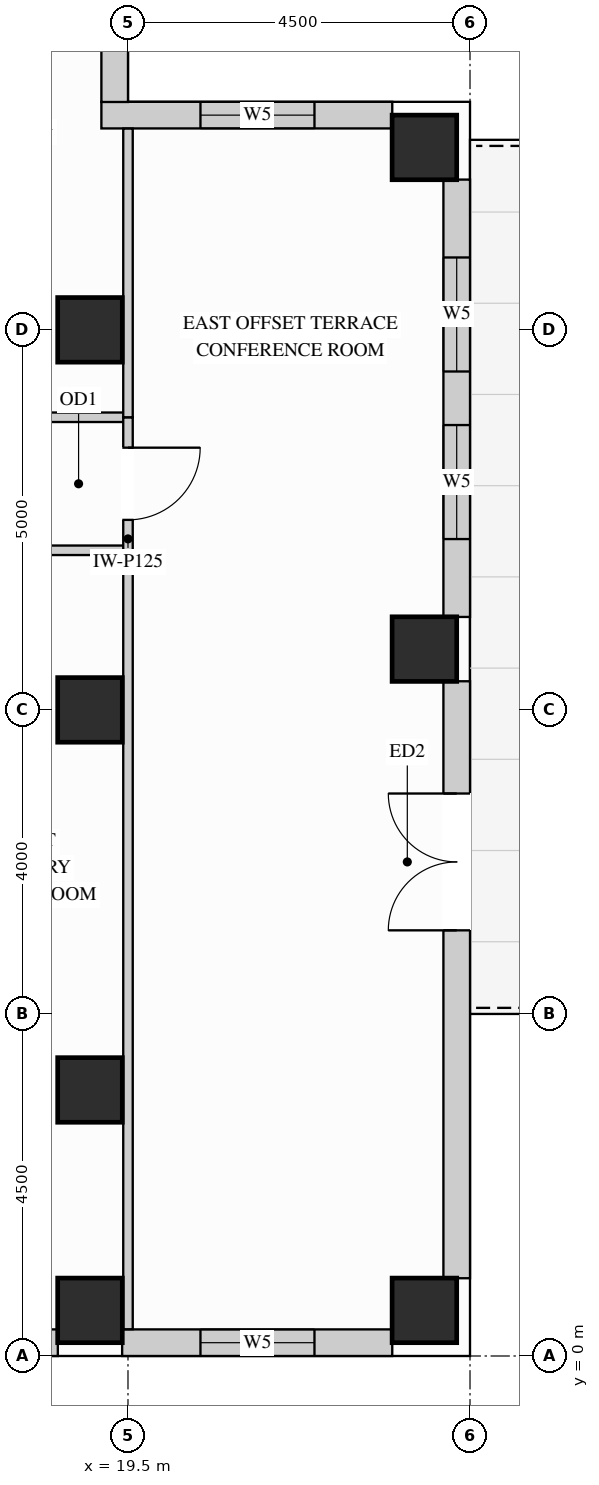
"""IFC4 building model, lengths in metres.
Left out: names, types, materials, properties, quantities, classifications, styles, units other than length and angle.
Written with IfcOpenShell. Run it as: python <this file> out.ifc"""

import sys

from ifc_helpers import new_model, si_unit, direction, frame, frame_2d, origin, origin_2d, place, context, subcontext, project, spatial, rectangle, extrude, source, transform, mapped, element, fill, save


model = new_model("IFC4")
c1 = context("Model", 3, precision=1e-05, world=origin(), true_north=direction((0.0, 1.0)))
c2 = subcontext(c1, "Body", "Model", "MODEL_VIEW")
j1 = project(units=[si_unit("LENGTHUNIT", "METRE"), si_unit("PLANEANGLEUNIT", "RADIAN")], contexts=[c1])
p1 = place(None, origin())
s1 = spatial("IfcSite", under=j1, at=p1, CompositionType="ELEMENT")
p2 = place(p1, origin())
s2 = spatial("IfcBuilding", under=s1, at=p2, CompositionType="ELEMENT")
p3 = place(p2, frame((0.0, 0.0, 262.8)))
s3 = spatial("IfcBuildingStorey", under=s2, at=p3, CompositionType="ELEMENT", Elevation=262.8)
m1 = source(origin(), c2, "Body", "SweptSolid", [
    extrude(rectangle(XDim=0.85, YDim=0.85, at=origin_2d()), origin(), (0.0, 0.0, 1.0), 3.4),
])
for number, where, z_axis, x_axis in (
    (1, (19.0, 13.5, 0.0), (0.0, 0.0, 1.0), (1.0, 0.0, 0.0)),
    (2, (19.0, 3.5, 0.0), (0.0, 0.0, 1.0), (1.0, 0.0, 0.0)),
    (3, (19.0, 8.5, 0.0), (0.0, 0.0, 1.0), (1.0, 0.0, 0.0)),
    (4, (19.0, 0.6, 0.0), (0.0, 0.0, 1.0), (1.0, 0.0, 0.0)),
    (5, (23.4, 0.6, 0.0), (0.0, 0.0, 1.0), (1.0, 0.0, 0.0)),
    (6, (23.4, 15.9, 0.0), (0.0, 0.0, 1.0), (1.0, 0.0, 0.0)),
    (7, (23.4, 9.3, 0.0), (0.0, 0.0, 1.0), (1.0, 0.0, 0.0)),
):
    element("IfcColumn", number, at=place(p3, frame(where, z_axis=z_axis, x_axis=x_axis)), inside=s3, PredefinedType="COLUMN", context=c2, shape_type="MappedRepresentation", body=[
        mapped(m1, transform((0.0, 0.0, 0.0), x_axis=(1.0, 0.0, 0.0), y_axis=(0.0, 1.0, 0.0), z_axis=(0.0, 0.0, 1.0))),
    ])
p4 = place(p3, frame((14.923, 0.175, 0.0), z_axis=(0.0, 0.0, 1.0), x_axis=(1.0, 0.0, 0.0)))
e8 = element("IfcWall", 8, at=p4, inside=s3, PredefinedType="SOLIDWALL", context=c2, shape_type="SweptSolid", body=[
    extrude(rectangle(XDim=3.654, YDim=0.35, at=frame_2d((1.827, 0.0))), origin(), (0.0, 0.0, 1.0), 3.385),
])
p5 = place(p4, frame((0.777, 0.0, 0.78)))
e9 = element("IfcOpeningElement", 9, at=p5, cuts=e8, PredefinedType="OPENING", context=c2, shape_type="SweptSolid", body=[
    extrude(rectangle(XDim=2.1, YDim=2.25, at=frame_2d((1.05, 1.125))), frame((0.0, 0.185, 0.0), z_axis=(0.0, -1.0, 0.0), x_axis=(1.0, 0.0, 0.0)), (0.0, 0.0, 1.0), 0.37),
])
p6 = place(p3, frame((19.423, 0.175, 0.0), z_axis=(0.0, 0.0, 1.0), x_axis=(1.0, 0.0, 0.0)))
e10 = element("IfcWall", 10, at=p6, inside=s3, PredefinedType="SOLIDWALL", context=c2, shape_type="SweptSolid", body=[
    extrude(rectangle(XDim=3.554, YDim=0.35, at=frame_2d((1.777, 0.0))), origin(), (0.0, 0.0, 1.0), 3.385),
])
p7 = place(p6, frame((1.031, 0.0, 0.78)))
e11 = element("IfcOpeningElement", 11, at=p7, cuts=e10, PredefinedType="OPENING", context=c2, shape_type="SweptSolid", body=[
    extrude(rectangle(XDim=1.5, YDim=2.0, at=frame_2d((0.75, 1.0))), frame((0.0, 0.185, 0.0), z_axis=(0.0, -1.0, 0.0), x_axis=(1.0, 0.0, 0.0)), (0.0, 0.0, 1.0), 0.37),
])
p8 = place(p3, frame((23.825, 1.023, 0.0), z_axis=(0.0, 0.0, 1.0), x_axis=(0.0, 1.0, 0.0)))
e12 = element("IfcWall", 12, at=p8, inside=s3, PredefinedType="SOLIDWALL", context=c2, shape_type="SweptSolid", body=[
    extrude(rectangle(XDim=7.854, YDim=0.35, at=frame_2d((3.927, 0.0))), origin(), (0.0, 0.0, 1.0), 3.385),
])
p9 = place(p8, frame((4.577, 0.0, 0.0)))
e13 = element("IfcOpeningElement", 13, at=p9, cuts=e12, PredefinedType="OPENING", context=c2, shape_type="SweptSolid", body=[
    extrude(rectangle(XDim=1.8, YDim=2.2, at=frame_2d((0.9, 1.1))), frame((0.0, 0.185, 0.0), z_axis=(0.0, -1.0, 0.0), x_axis=(1.0, 0.0, 0.0)), (0.0, 0.0, 1.0), 0.37),
])
p10 = place(p3, frame((23.825, 9.723, 0.0), z_axis=(0.0, 0.0, 1.0), x_axis=(0.0, 1.0, 0.0)))
e14 = element("IfcWall", 14, at=p10, inside=s3, PredefinedType="SOLIDWALL", context=c2, shape_type="SweptSolid", body=[
    extrude(rectangle(XDim=5.754, YDim=0.35, at=frame_2d((2.877, 0.0))), origin(), (0.0, 0.0, 1.0), 3.385),
])
p11 = place(p10, frame((1.025, 0.0, 0.78)))
e15 = element("IfcOpeningElement", 15, at=p11, cuts=e14, PredefinedType="OPENING", context=c2, shape_type="SweptSolid", body=[
    extrude(rectangle(XDim=1.5, YDim=2.0, at=frame_2d((0.75, 1.0))), frame((0.0, 0.185, 0.0), z_axis=(0.0, -1.0, 0.0), x_axis=(1.0, 0.0, 0.0)), (0.0, 0.0, 1.0), 0.37),
])
p12 = place(p10, frame((3.229, 0.0, 0.78)))
e16 = element("IfcOpeningElement", 16, at=p12, cuts=e14, PredefinedType="OPENING", context=c2, shape_type="SweptSolid", body=[
    extrude(rectangle(XDim=1.5, YDim=2.0, at=frame_2d((0.75, 1.0))), frame((0.0, 0.185, 0.0), z_axis=(0.0, -1.0, 0.0), x_axis=(1.0, 0.0, 0.0)), (0.0, 0.0, 1.0), 0.37),
])
p13 = place(p3, frame((22.977, 16.325, 0.0), z_axis=(0.0, 0.0, 1.0), x_axis=(-1.0, 0.0, 0.0)))
e17 = element("IfcWall", 17, at=p13, inside=s3, PredefinedType="SOLIDWALL", context=c2, shape_type="SweptSolid", body=[
    extrude(rectangle(XDim=3.827, YDim=0.35, at=frame_2d((1.914, 0.0))), origin(), (0.0, 0.0, 1.0), 3.385),
])
p14 = place(p13, frame((1.023, 0.0, 0.78)))
e18 = element("IfcOpeningElement", 18, at=p14, cuts=e17, PredefinedType="OPENING", context=c2, shape_type="SweptSolid", body=[
    extrude(rectangle(XDim=1.5, YDim=2.0, at=frame_2d((0.75, 1.0))), frame((0.0, 0.185, 0.0), z_axis=(0.0, -1.0, 0.0), x_axis=(1.0, 0.0, 0.0)), (0.0, 0.0, 1.0), 0.37),
])
m2 = source(origin(), c2, "Body", "SweptSolid", [
    extrude(rectangle(XDim=1.079, YDim=0.35, at=frame_2d((0.54, 0.0))), origin(), (0.0, 0.0, 1.0), 2.619),
])
p15 = place(p3, frame((19.325, 16.498, 0.0), z_axis=(0.0, 0.0, 1.0), x_axis=(0.0, 1.0, 0.0)))
e19 = element("IfcWall", 19, at=p15, inside=s3, PredefinedType="SOLIDWALL", context=c2, shape_type="MappedRepresentation", body=[
    mapped(m2, transform((0.0, 0.0, 0.0), x_axis=(1.0, 0.0, 0.0), y_axis=(0.0, 1.0, 0.0), z_axis=(0.0, 0.0, 1.0))),
])
m3 = source(origin(), c2, "Body", "SweptSolid", [
    extrude(rectangle(XDim=3.15, YDim=0.125, at=frame_2d((1.575, 0.0))), origin(), (0.0, 0.0, 1.0), 3.385),
])
for number, where, z_axis, x_axis in (
    (20, (16.35, 12.35, 0.0), (0.0, 0.0, 1.0), (1.0, 0.0, 0.0)),
    (21, (16.35, 10.6, 0.0), (0.0, 0.0, 1.0), (1.0, 0.0, 0.0)),
):
    element("IfcWall", number, at=place(p3, frame(where, z_axis=z_axis, x_axis=x_axis)), inside=s3, PredefinedType="PARTITIONING", context=c2, shape_type="MappedRepresentation", body=[
        mapped(m3, transform((0.0, 0.0, 0.0), x_axis=(1.0, 0.0, 0.0), y_axis=(0.0, 1.0, 0.0), z_axis=(0.0, 0.0, 1.0))),
    ])
p16 = place(p3, frame((19.5, 10.6, 0.0), z_axis=(0.0, 0.0, 1.0), x_axis=(0.0, 1.0, 0.0)))
e22 = element("IfcWall", 22, at=p16, inside=s3, PredefinedType="PARTITIONING", context=c2, shape_type="SweptSolid", body=[
    extrude(rectangle(XDim=1.75, YDim=0.125, at=frame_2d((0.875, 0.0))), origin(), (0.0, 0.0, 1.0), 3.385),
])
p17 = place(p16, frame((0.4, 0.0, 0.0)))
e23 = element("IfcOpeningElement", 23, at=p17, cuts=e22, PredefinedType="OPENING", context=c2, shape_type="SweptSolid", body=[
    extrude(rectangle(XDim=0.95, YDim=2.15, at=frame_2d((0.475, 1.075))), frame((0.0, 0.073, 0.0), z_axis=(0.0, -1.0, 0.0), x_axis=(1.0, 0.0, 0.0)), (0.0, 0.0, 1.0), 0.145),
])
m4 = source(origin(), c2, "Body", "SweptSolid", [
    extrude(rectangle(XDim=10.248, YDim=0.125, at=frame_2d((5.124, 0.0))), origin(), (0.0, 0.0, 1.0), 3.385),
])
p18 = place(p3, frame((19.5, 0.352, 0.0), z_axis=(0.0, 0.0, 1.0), x_axis=(0.0, 1.0, 0.0)))
e24 = element("IfcWall", 24, at=p18, inside=s3, PredefinedType="PARTITIONING", context=c2, shape_type="MappedRepresentation", body=[
    mapped(m4, transform((0.0, 0.0, 0.0), x_axis=(1.0, 0.0, 0.0), y_axis=(0.0, 1.0, 0.0), z_axis=(0.0, 0.0, 1.0))),
])
m5 = source(origin(), c2, "Body", "SweptSolid", [
    extrude(rectangle(XDim=3.798, YDim=0.125, at=frame_2d((1.899, 0.0))), origin(), (0.0, 0.0, 1.0), 3.385),
])
p19 = place(p3, frame((19.5, 12.35, 0.0), z_axis=(0.0, 0.0, 1.0), x_axis=(0.0, 1.0, 0.0)))
e25 = element("IfcWall", 25, at=p19, inside=s3, PredefinedType="PARTITIONING", context=c2, shape_type="MappedRepresentation", body=[
    mapped(m5, transform((0.0, 0.0, 0.0), x_axis=(1.0, 0.0, 0.0), y_axis=(0.0, 1.0, 0.0), z_axis=(0.0, 0.0, 1.0))),
])
m6 = source(origin(), c2, "Body", "SweptSolid", [
    extrude(rectangle(XDim=1.8, YDim=2.2, at=frame_2d((0.9, 1.1))), frame((0.0, 0.025, 0.0), z_axis=(0.0, -1.0, 0.0), x_axis=(1.0, 0.0, 0.0)), (0.0, 0.0, 1.0), 0.05),
])
p20 = place(p9, frame((1.8, 0.0, 0.0), z_axis=(0.0, 0.0, 1.0), x_axis=(-1.0, 0.0, 0.0)))
e26 = element("IfcDoor", 26, at=p20, inside=s3, OperationType="DOUBLE_DOOR_SINGLE_SWING", PredefinedType="DOOR", context=c2, shape_type="MappedRepresentation", body=[
    mapped(m6, transform((0.0, 0.0, 0.0), x_axis=(1.0, 0.0, 0.0), y_axis=(0.0, 1.0, 0.0), z_axis=(0.0, 0.0, 1.0))),
])
fill(e13, e26)
m7 = source(origin(), c2, "Body", "SweptSolid", [
    extrude(rectangle(XDim=0.95, YDim=2.15, at=frame_2d((0.475, 1.075))), frame((0.0, 0.025, 0.0), z_axis=(0.0, -1.0, 0.0), x_axis=(1.0, 0.0, 0.0)), (0.0, 0.0, 1.0), 0.05),
])
p21 = place(p17, origin())
e27 = element("IfcDoor", 27, at=p21, inside=s3, OperationType="SINGLE_SWING_RIGHT", PredefinedType="DOOR", context=c2, shape_type="MappedRepresentation", body=[
    mapped(m7, transform((0.0, 0.0, 0.0), x_axis=(1.0, 0.0, 0.0), y_axis=(0.0, 1.0, 0.0), z_axis=(0.0, 0.0, 1.0))),
])
fill(e23, e27)
m8 = source(origin(), c2, "Body", "SweptSolid", [
    extrude(rectangle(XDim=1.5, YDim=2.0, at=frame_2d((0.75, 1.0))), frame((0.0, 0.03, 0.0), z_axis=(0.0, -1.0, 0.0), x_axis=(1.0, 0.0, 0.0)), (0.0, 0.0, 1.0), 0.06),
])
p22 = place(p7, origin())
e28 = element("IfcWindow", 28, at=p22, inside=s3, PartitioningType="SINGLE_PANEL", PredefinedType="WINDOW", context=c2, shape_type="MappedRepresentation", body=[
    mapped(m8, transform((0.0, 0.0, 0.0), x_axis=(1.0, 0.0, 0.0), y_axis=(0.0, 1.0, 0.0), z_axis=(0.0, 0.0, 1.0))),
])
fill(e11, e28)
p23 = place(p11, origin())
e29 = element("IfcWindow", 29, at=p23, inside=s3, PartitioningType="SINGLE_PANEL", PredefinedType="WINDOW", context=c2, shape_type="MappedRepresentation", body=[
    mapped(m8, transform((0.0, 0.0, 0.0), x_axis=(1.0, 0.0, 0.0), y_axis=(0.0, 1.0, 0.0), z_axis=(0.0, 0.0, 1.0))),
])
fill(e15, e29)
p24 = place(p12, origin())
e30 = element("IfcWindow", 30, at=p24, inside=s3, PartitioningType="SINGLE_PANEL", PredefinedType="WINDOW", context=c2, shape_type="MappedRepresentation", body=[
    mapped(m8, transform((0.0, 0.0, 0.0), x_axis=(1.0, 0.0, 0.0), y_axis=(0.0, 1.0, 0.0), z_axis=(0.0, 0.0, 1.0))),
])
fill(e16, e30)
p25 = place(p14, origin())
e31 = element("IfcWindow", 31, at=p25, inside=s3, PartitioningType="SINGLE_PANEL", PredefinedType="WINDOW", context=c2, shape_type="MappedRepresentation", body=[
    mapped(m8, transform((0.0, 0.0, 0.0), x_axis=(1.0, 0.0, 0.0), y_axis=(0.0, 1.0, 0.0), z_axis=(0.0, 0.0, 1.0))),
])
fill(e18, e31)
save(model, sys.argv[1])
